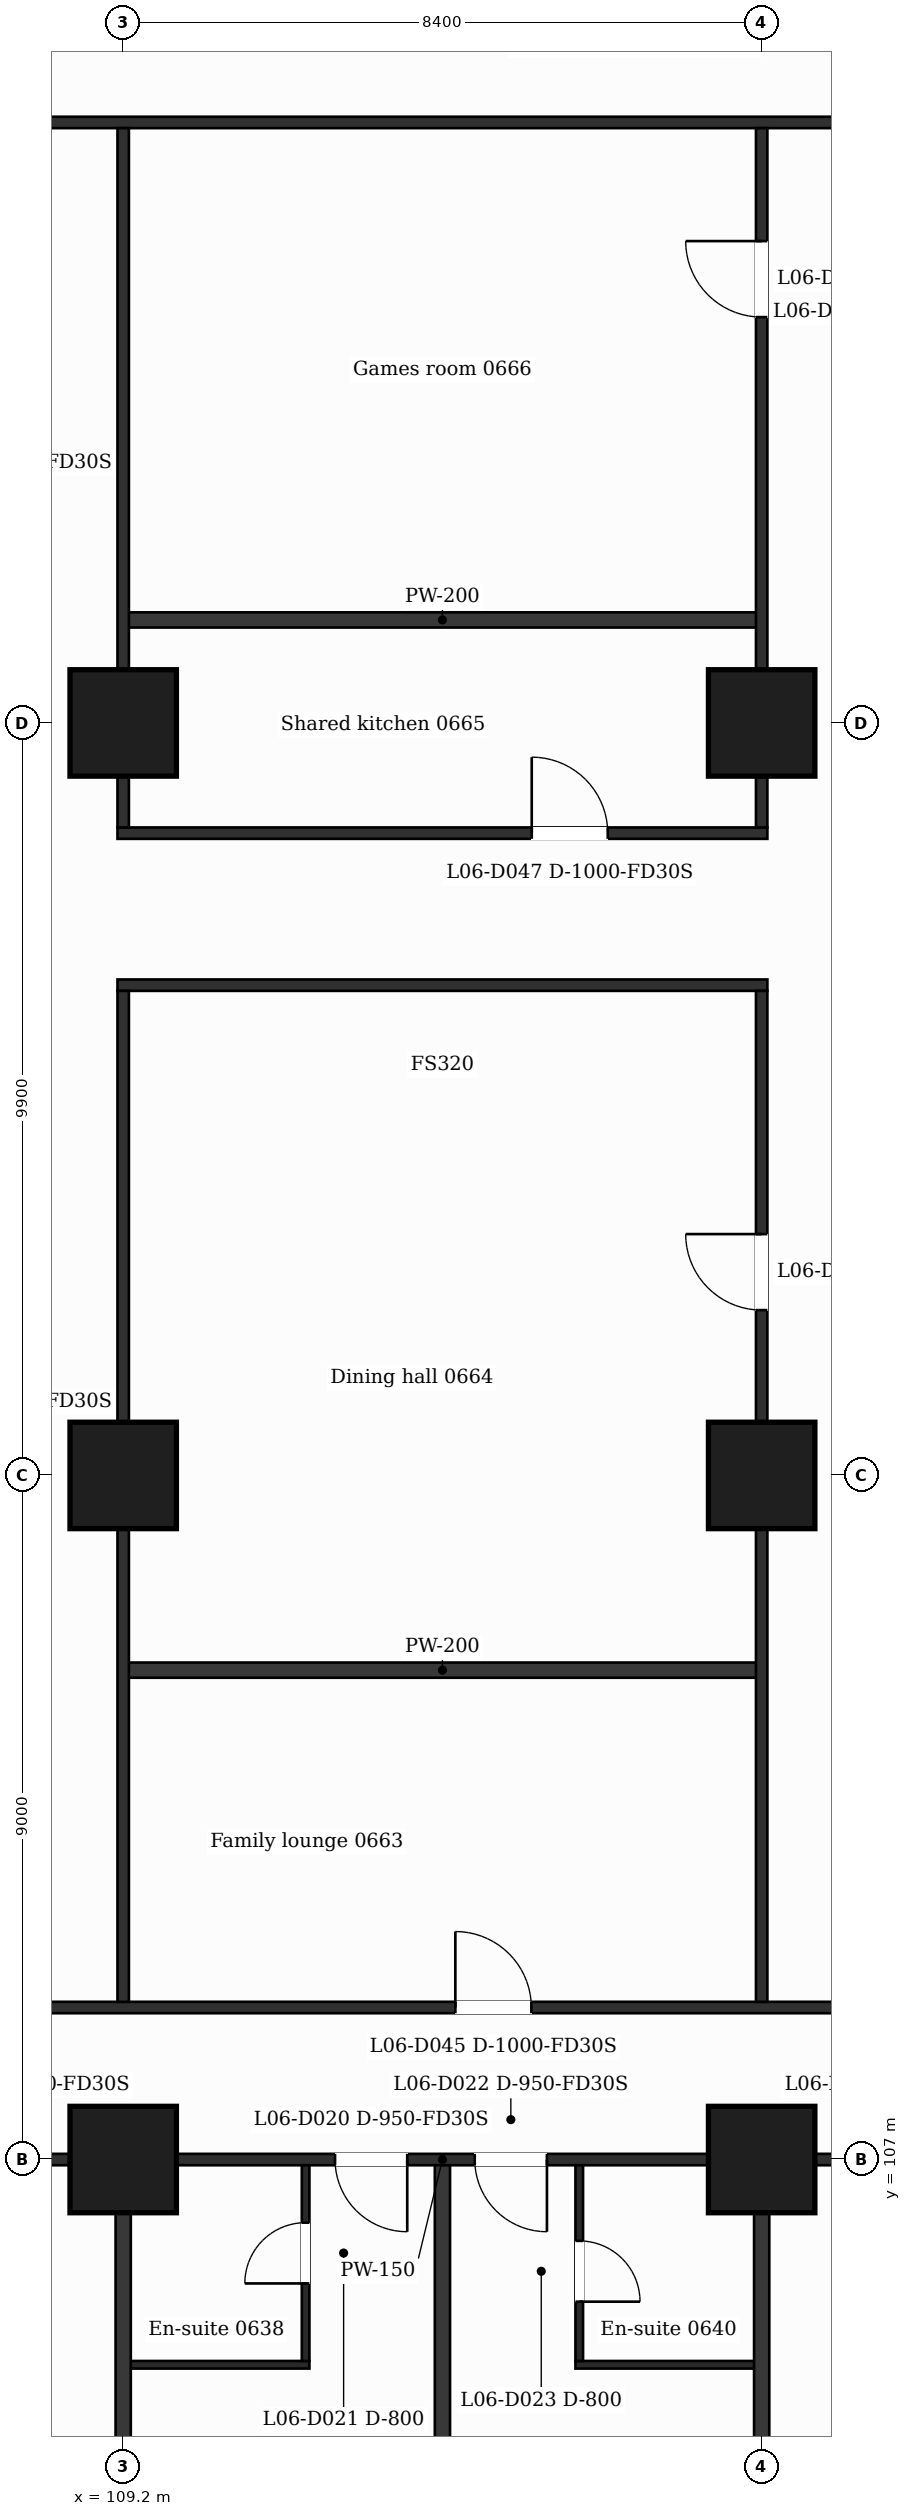
"""IFC4 building model, lengths in metres.
Left out: names, types, materials, properties, quantities, classifications, styles, units other than length and angle.
Written with IfcOpenShell. Run it as: python <this file> out.ifc"""

import sys

from ifc_helpers import new_model, si_unit, direction, frame, frame_2d, origin, origin_2d, place, context, subcontext, project, spatial, rectangle, extrude, element, fill, save


model = new_model("IFC4")
c1 = context("Model", 3, precision=1e-05, world=origin(), true_north=direction((0.0, 1.0)))
c2 = subcontext(c1, "Body", "Model", "MODEL_VIEW")
j1 = project(units=[si_unit("LENGTHUNIT", "METRE"), si_unit("PLANEANGLEUNIT", "RADIAN")], contexts=[c1])
p1 = place(None, origin())
s1 = spatial("IfcSite", under=j1, at=p1, CompositionType="ELEMENT")
p2 = place(p1, origin())
s2 = spatial("IfcBuilding", under=s1, at=p2, CompositionType="ELEMENT")
p3 = place(p2, frame((0.0, 0.0, 39.0)))
s3 = spatial("IfcBuildingStorey", under=s2, at=p3, CompositionType="ELEMENT", Elevation=39.0)
for number, where, z_axis, x_axis in (
    (1, (109.2, 107.0, -0.32), (0.0, 0.0, 1.0), (1.0, 0.0, 0.0)),
    (2, (117.6, 107.0, -0.32), (0.0, 0.0, 1.0), (1.0, 0.0, 0.0)),
    (3, (109.2, 116.0, -0.32), (0.0, 0.0, 1.0), (1.0, 0.0, 0.0)),
    (4, (117.6, 116.0, -0.32), (0.0, 0.0, 1.0), (1.0, 0.0, 0.0)),
    (5, (109.2, 125.9, -0.32), (0.0, 0.0, 1.0), (1.0, 0.0, 0.0)),
    (6, (117.6, 125.9, -0.32), (0.0, 0.0, 1.0), (1.0, 0.0, 0.0)),
):
    element("IfcColumn", number, at=place(p3, frame(where, z_axis=z_axis, x_axis=x_axis)), inside=s3, PredefinedType="COLUMN", context=c2, shape_type="SweptSolid", body=[
        extrude(rectangle(XDim=1.4, YDim=1.4, at=origin_2d()), origin(), (0.0, 0.0, 1.0), 3.82),
    ])
p4 = place(p3, frame((109.2, 104.3, 0.0), z_axis=(0.0, 0.0, 1.0), x_axis=(1.0, 0.0, 0.0)))
e7 = element("IfcWall", 7, at=p4, inside=s3, PredefinedType="PARTITIONING", context=c2, shape_type="SweptSolid", body=[
    extrude(rectangle(XDim=2.45, YDim=0.1, at=frame_2d((1.225, 0.0))), origin(), (0.0, 0.0, 1.0), 3.18),
])
p5 = place(p3, frame((115.15, 104.3, 0.0), z_axis=(0.0, 0.0, 1.0), x_axis=(1.0, 0.0, 0.0)))
e8 = element("IfcWall", 8, at=p5, inside=s3, PredefinedType="PARTITIONING", context=c2, shape_type="SweptSolid", body=[
    extrude(rectangle(XDim=2.45, YDim=0.1, at=frame_2d((1.225, 0.0))), origin(), (0.0, 0.0, 1.0), 3.18),
])
p6 = place(p3, frame((87.018, 107.0, 0.0), z_axis=(0.0, 0.0, 1.0), x_axis=(1.0, 0.0, 0.0)))
e9 = element("IfcWall", 9, at=p6, inside=s3, PredefinedType="PARTITIONING", context=c2, shape_type="SweptSolid", body=[
    extrude(rectangle(XDim=52.765, YDim=0.15, at=frame_2d((26.382, 0.0))), origin(), (0.0, 0.0, 1.0), 3.18),
])
p7 = place(p6, frame((1.032, 0.0, 0.0)))
e10 = element("IfcOpeningElement", 10, at=p7, cuts=e9, PredefinedType="OPENING", context=c2, shape_type="SweptSolid", body=[
    extrude(rectangle(XDim=0.95, YDim=2.1, at=frame_2d((0.475, 1.05))), frame((0.0, 0.085, 0.0), z_axis=(0.0, -1.0, 0.0), x_axis=(1.0, 0.0, 0.0)), (0.0, 0.0, 1.0), 0.17),
])
p8 = place(p6, frame((6.369, 0.0, 0.0)))
e11 = element("IfcOpeningElement", 11, at=p8, cuts=e9, PredefinedType="OPENING", context=c2, shape_type="SweptSolid", body=[
    extrude(rectangle(XDim=0.95, YDim=2.1, at=frame_2d((0.475, 1.05))), frame((0.0, 0.085, 0.0), z_axis=(0.0, -1.0, 0.0), x_axis=(1.0, 0.0, 0.0)), (0.0, 0.0, 1.0), 0.17),
])
p9 = place(p6, frame((10.952, 0.0, 0.0)))
e12 = element("IfcOpeningElement", 12, at=p9, cuts=e9, PredefinedType="OPENING", context=c2, shape_type="SweptSolid", body=[
    extrude(rectangle(XDim=0.95, YDim=2.1, at=frame_2d((0.475, 1.05))), frame((0.0, 0.085, 0.0), z_axis=(0.0, -1.0, 0.0), x_axis=(1.0, 0.0, 0.0)), (0.0, 0.0, 1.0), 0.17),
])
p10 = place(p6, frame((16.045, 0.0, 0.0)))
e13 = element("IfcOpeningElement", 13, at=p10, cuts=e9, PredefinedType="OPENING", context=c2, shape_type="SweptSolid", body=[
    extrude(rectangle(XDim=0.95, YDim=2.1, at=frame_2d((0.475, 1.05))), frame((0.0, 0.085, 0.0), z_axis=(0.0, -1.0, 0.0), x_axis=(1.0, 0.0, 0.0)), (0.0, 0.0, 1.0), 0.17),
])
p11 = place(p6, frame((20.245, 0.0, 0.0)))
e14 = element("IfcOpeningElement", 14, at=p11, cuts=e9, PredefinedType="OPENING", context=c2, shape_type="SweptSolid", body=[
    extrude(rectangle(XDim=0.95, YDim=2.1, at=frame_2d((0.475, 1.05))), frame((0.0, 0.085, 0.0), z_axis=(0.0, -1.0, 0.0), x_axis=(1.0, 0.0, 0.0)), (0.0, 0.0, 1.0), 0.17),
])
p12 = place(p6, frame((24.969, 0.0, 0.0)))
e15 = element("IfcOpeningElement", 15, at=p12, cuts=e9, PredefinedType="OPENING", context=c2, shape_type="SweptSolid", body=[
    extrude(rectangle(XDim=0.95, YDim=2.1, at=frame_2d((0.475, 1.05))), frame((0.0, 0.085, 0.0), z_axis=(0.0, -1.0, 0.0), x_axis=(1.0, 0.0, 0.0)), (0.0, 0.0, 1.0), 0.17),
])
p13 = place(p6, frame((26.807, 0.0, 0.0)))
e16 = element("IfcOpeningElement", 16, at=p13, cuts=e9, PredefinedType="OPENING", context=c2, shape_type="SweptSolid", body=[
    extrude(rectangle(XDim=0.95, YDim=2.1, at=frame_2d((0.475, 1.05))), frame((0.0, 0.085, 0.0), z_axis=(0.0, -1.0, 0.0), x_axis=(1.0, 0.0, 0.0)), (0.0, 0.0, 1.0), 0.17),
])
p14 = place(p6, frame((31.952, 0.0, 0.0)))
e17 = element("IfcOpeningElement", 17, at=p14, cuts=e9, PredefinedType="OPENING", context=c2, shape_type="SweptSolid", body=[
    extrude(rectangle(XDim=0.95, YDim=2.1, at=frame_2d((0.475, 1.05))), frame((0.0, 0.085, 0.0), z_axis=(0.0, -1.0, 0.0), x_axis=(1.0, 0.0, 0.0)), (0.0, 0.0, 1.0), 0.17),
])
p15 = place(p6, frame((40.795, 0.0, 0.0)))
e18 = element("IfcOpeningElement", 18, at=p15, cuts=e9, PredefinedType="OPENING", context=c2, shape_type="SweptSolid", body=[
    extrude(rectangle(XDim=0.95, YDim=2.1, at=frame_2d((0.475, 1.05))), frame((0.0, 0.085, 0.0), z_axis=(0.0, -1.0, 0.0), x_axis=(1.0, 0.0, 0.0)), (0.0, 0.0, 1.0), 0.17),
])
p16 = place(p6, frame((43.644, 0.0, 0.0)))
e19 = element("IfcOpeningElement", 19, at=p16, cuts=e9, PredefinedType="OPENING", context=c2, shape_type="SweptSolid", body=[
    extrude(rectangle(XDim=0.95, YDim=2.1, at=frame_2d((0.475, 1.05))), frame((0.0, 0.085, 0.0), z_axis=(0.0, -1.0, 0.0), x_axis=(1.0, 0.0, 0.0)), (0.0, 0.0, 1.0), 0.17),
])
p17 = place(p6, frame((48.767, 0.0, 0.0)))
e20 = element("IfcOpeningElement", 20, at=p17, cuts=e9, PredefinedType="OPENING", context=c2, shape_type="SweptSolid", body=[
    extrude(rectangle(XDim=0.95, YDim=2.1, at=frame_2d((0.475, 1.05))), frame((0.0, 0.085, 0.0), z_axis=(0.0, -1.0, 0.0), x_axis=(1.0, 0.0, 0.0)), (0.0, 0.0, 1.0), 0.17),
])
p18 = place(p3, frame((100.725, 109.0, 0.0), z_axis=(0.0, 0.0, 1.0), x_axis=(1.0, 0.0, 0.0)))
e21 = element("IfcWall", 21, at=p18, inside=s3, PredefinedType="PARTITIONING", context=c2, shape_type="SweptSolid", body=[
    extrude(rectangle(XDim=25.35, YDim=0.15, at=frame_2d((12.675, 0.0))), origin(), (0.0, 0.0, 1.0), 3.18),
])
p19 = place(p18, frame((1.2, 0.0, 0.0)))
e22 = element("IfcOpeningElement", 22, at=p19, cuts=e21, PredefinedType="OPENING", context=c2, shape_type="SweptSolid", body=[
    extrude(rectangle(XDim=1.0, YDim=2.1, at=frame_2d((0.5, 1.05))), frame((0.0, 0.085, 0.0), z_axis=(0.0, -1.0, 0.0), x_axis=(1.0, 0.0, 0.0)), (0.0, 0.0, 1.0), 0.17),
])
p20 = place(p18, frame((12.845, 0.0, 0.0)))
e23 = element("IfcOpeningElement", 23, at=p20, cuts=e21, PredefinedType="OPENING", context=c2, shape_type="SweptSolid", body=[
    extrude(rectangle(XDim=1.0, YDim=2.1, at=frame_2d((0.5, 1.05))), frame((0.0, 0.085, 0.0), z_axis=(0.0, -1.0, 0.0), x_axis=(1.0, 0.0, 0.0)), (0.0, 0.0, 1.0), 0.17),
])
p21 = place(p18, frame((23.15, 0.0, 0.0)))
e24 = element("IfcOpeningElement", 24, at=p21, cuts=e21, PredefinedType="OPENING", context=c2, shape_type="SweptSolid", body=[
    extrude(rectangle(XDim=1.0, YDim=2.1, at=frame_2d((0.5, 1.05))), frame((0.0, 0.085, 0.0), z_axis=(0.0, -1.0, 0.0), x_axis=(1.0, 0.0, 0.0)), (0.0, 0.0, 1.0), 0.17),
])
p22 = place(p3, frame((109.2, 113.438, 0.0), z_axis=(0.0, 0.0, 1.0), x_axis=(1.0, 0.0, 0.0)))
e25 = element("IfcWall", 25, at=p22, inside=s3, PredefinedType="PARTITIONING", context=c2, shape_type="SweptSolid", body=[
    extrude(rectangle(XDim=8.4, YDim=0.2, at=frame_2d((4.2, 0.0))), origin(), (0.0, 0.0, 1.0), 3.18),
])
p23 = place(p3, frame((109.125, 122.45, 0.0), z_axis=(0.0, 0.0, 1.0), x_axis=(1.0, 0.0, 0.0)))
e26 = element("IfcWall", 26, at=p23, inside=s3, PredefinedType="PARTITIONING", context=c2, shape_type="SweptSolid", body=[
    extrude(rectangle(XDim=8.55, YDim=0.15, at=frame_2d((4.275, 0.0))), origin(), (0.0, 0.0, 1.0), 3.18),
])
p24 = place(p3, frame((109.125, 124.45, 0.0), z_axis=(0.0, 0.0, 1.0), x_axis=(1.0, 0.0, 0.0)))
e27 = element("IfcWall", 27, at=p24, inside=s3, PredefinedType="PARTITIONING", context=c2, shape_type="SweptSolid", body=[
    extrude(rectangle(XDim=8.55, YDim=0.15, at=frame_2d((4.275, 0.0))), origin(), (0.0, 0.0, 1.0), 3.18),
])
p25 = place(p24, frame((5.45, 0.0, 0.0)))
e28 = element("IfcOpeningElement", 28, at=p25, cuts=e27, PredefinedType="OPENING", context=c2, shape_type="SweptSolid", body=[
    extrude(rectangle(XDim=1.0, YDim=2.1, at=frame_2d((0.5, 1.05))), frame((0.0, 0.085, 0.0), z_axis=(0.0, -1.0, 0.0), x_axis=(1.0, 0.0, 0.0)), (0.0, 0.0, 1.0), 0.17),
])
p26 = place(p3, frame((109.2, 127.255, 0.0), z_axis=(0.0, 0.0, 1.0), x_axis=(1.0, 0.0, 0.0)))
e29 = element("IfcWall", 29, at=p26, inside=s3, PredefinedType="PARTITIONING", context=c2, shape_type="SweptSolid", body=[
    extrude(rectangle(XDim=8.4, YDim=0.2, at=frame_2d((4.2, 0.0))), origin(), (0.0, 0.0, 1.0), 3.18),
])
p27 = place(p3, frame((100.725, 133.8, 0.0), z_axis=(0.0, 0.0, 1.0), x_axis=(1.0, 0.0, 0.0)))
e30 = element("IfcWall", 30, at=p27, inside=s3, PredefinedType="PARTITIONING", context=c2, shape_type="SweptSolid", body=[
    extrude(rectangle(XDim=25.35, YDim=0.15, at=frame_2d((12.675, 0.0))), origin(), (0.0, 0.0, 1.0), 3.18),
])
p28 = place(p3, frame((109.2, 99.79, 0.0), z_axis=(0.0, 0.0, 1.0), x_axis=(0.0, 1.0, 0.0)))
e31 = element("IfcWall", 31, at=p28, inside=s3, PredefinedType="PARTITIONING", context=c2, shape_type="SweptSolid", body=[
    extrude(rectangle(XDim=7.135, YDim=0.2, at=frame_2d((3.567, 0.0))), origin(), (0.0, 0.0, 1.0), 3.18),
])
p29 = place(p3, frame((109.2, 109.075, 0.0), z_axis=(0.0, 0.0, 1.0), x_axis=(0.0, 1.0, 0.0)))
e32 = element("IfcWall", 32, at=p29, inside=s3, PredefinedType="PARTITIONING", context=c2, shape_type="SweptSolid", body=[
    extrude(rectangle(XDim=13.3, YDim=0.15, at=frame_2d((6.65, 0.0))), origin(), (0.0, 0.0, 1.0), 3.18),
])
p30 = place(p3, frame((109.2, 124.525, 0.0), z_axis=(0.0, 0.0, 1.0), x_axis=(0.0, 1.0, 0.0)))
e33 = element("IfcWall", 33, at=p30, inside=s3, PredefinedType="PARTITIONING", context=c2, shape_type="SweptSolid", body=[
    extrude(rectangle(XDim=9.2, YDim=0.15, at=frame_2d((4.6, 0.0))), origin(), (0.0, 0.0, 1.0), 3.18),
])
p31 = place(p3, frame((111.6, 104.35, 0.0), z_axis=(0.0, 0.0, 1.0), x_axis=(0.0, 1.0, 0.0)))
e34 = element("IfcWall", 34, at=p31, inside=s3, PredefinedType="PARTITIONING", context=c2, shape_type="SweptSolid", body=[
    extrude(rectangle(XDim=2.575, YDim=0.1, at=frame_2d((1.288, 0.0))), origin(), (0.0, 0.0, 1.0), 3.18),
])
p32 = place(p31, frame((1.02, 0.0, 0.0)))
e35 = element("IfcOpeningElement", 35, at=p32, cuts=e34, PredefinedType="OPENING", context=c2, shape_type="SweptSolid", body=[
    extrude(rectangle(XDim=0.8, YDim=2.1, at=frame_2d((0.4, 1.05))), frame((0.0, 0.06, 0.0), z_axis=(0.0, -1.0, 0.0), x_axis=(1.0, 0.0, 0.0)), (0.0, 0.0, 1.0), 0.12),
])
p33 = place(p3, frame((113.4, 99.79, 0.0), z_axis=(0.0, 0.0, 1.0), x_axis=(0.0, 1.0, 0.0)))
e36 = element("IfcWall", 36, at=p33, inside=s3, PredefinedType="PARTITIONING", context=c2, shape_type="SweptSolid", body=[
    extrude(rectangle(XDim=7.135, YDim=0.2, at=frame_2d((3.567, 0.0))), origin(), (0.0, 0.0, 1.0), 3.18),
])
p34 = place(p3, frame((115.2, 104.35, 0.0), z_axis=(0.0, 0.0, 1.0), x_axis=(0.0, 1.0, 0.0)))
e37 = element("IfcWall", 37, at=p34, inside=s3, PredefinedType="PARTITIONING", context=c2, shape_type="SweptSolid", body=[
    extrude(rectangle(XDim=2.575, YDim=0.1, at=frame_2d((1.288, 0.0))), origin(), (0.0, 0.0, 1.0), 3.18),
])
p35 = place(p34, frame((0.78, 0.0, 0.0)))
e38 = element("IfcOpeningElement", 38, at=p35, cuts=e37, PredefinedType="OPENING", context=c2, shape_type="SweptSolid", body=[
    extrude(rectangle(XDim=0.8, YDim=2.1, at=frame_2d((0.4, 1.05))), frame((0.0, 0.06, 0.0), z_axis=(0.0, -1.0, 0.0), x_axis=(1.0, 0.0, 0.0)), (0.0, 0.0, 1.0), 0.12),
])
p36 = place(p3, frame((117.6, 99.79, 0.0), z_axis=(0.0, 0.0, 1.0), x_axis=(0.0, 1.0, 0.0)))
e39 = element("IfcWall", 39, at=p36, inside=s3, PredefinedType="PARTITIONING", context=c2, shape_type="SweptSolid", body=[
    extrude(rectangle(XDim=7.135, YDim=0.2, at=frame_2d((3.567, 0.0))), origin(), (0.0, 0.0, 1.0), 3.18),
])
p37 = place(p3, frame((117.6, 109.075, 0.0), z_axis=(0.0, 0.0, 1.0), x_axis=(0.0, 1.0, 0.0)))
e40 = element("IfcWall", 40, at=p37, inside=s3, PredefinedType="PARTITIONING", context=c2, shape_type="SweptSolid", body=[
    extrude(rectangle(XDim=13.3, YDim=0.15, at=frame_2d((6.65, 0.0))), origin(), (0.0, 0.0, 1.0), 3.18),
])
p38 = place(p37, frame((9.1, 0.0, 0.0)))
e41 = element("IfcOpeningElement", 41, at=p38, cuts=e40, PredefinedType="OPENING", context=c2, shape_type="SweptSolid", body=[
    extrude(rectangle(XDim=1.0, YDim=2.1, at=frame_2d((0.5, 1.05))), frame((0.0, 0.085, 0.0), z_axis=(0.0, -1.0, 0.0), x_axis=(1.0, 0.0, 0.0)), (0.0, 0.0, 1.0), 0.17),
])
p39 = place(p3, frame((117.6, 124.525, 0.0), z_axis=(0.0, 0.0, 1.0), x_axis=(0.0, 1.0, 0.0)))
e42 = element("IfcWall", 42, at=p39, inside=s3, PredefinedType="PARTITIONING", context=c2, shape_type="SweptSolid", body=[
    extrude(rectangle(XDim=9.2, YDim=0.15, at=frame_2d((4.6, 0.0))), origin(), (0.0, 0.0, 1.0), 3.18),
])
p40 = place(p39, frame((6.714, 0.0, 0.0)))
e43 = element("IfcOpeningElement", 43, at=p40, cuts=e42, PredefinedType="OPENING", context=c2, shape_type="SweptSolid", body=[
    extrude(rectangle(XDim=1.0, YDim=2.1, at=frame_2d((0.5, 1.05))), frame((0.0, 0.085, 0.0), z_axis=(0.0, -1.0, 0.0), x_axis=(1.0, 0.0, 0.0)), (0.0, 0.0, 1.0), 0.17),
])
p41 = place(p12, origin())
e44 = element("IfcDoor", 44, at=p41, inside=s3, OperationType="SINGLE_SWING_RIGHT", PredefinedType="DOOR", context=c2, shape_type="SweptSolid", body=[
    extrude(rectangle(XDim=0.95, YDim=2.1, at=frame_2d((0.475, 1.05))), frame((0.0, 0.025, 0.0), z_axis=(0.0, -1.0, 0.0), x_axis=(1.0, 0.0, 0.0)), (0.0, 0.0, 1.0), 0.05),
])
fill(e15, e44)
p42 = place(p32, origin())
e45 = element("IfcDoor", 45, at=p42, inside=s3, OperationType="SINGLE_SWING_LEFT", PredefinedType="DOOR", context=c2, shape_type="SweptSolid", body=[
    extrude(rectangle(XDim=0.8, YDim=2.1, at=frame_2d((0.4, 1.05))), frame((0.0, 0.025, 0.0), z_axis=(0.0, -1.0, 0.0), x_axis=(1.0, 0.0, 0.0)), (0.0, 0.0, 1.0), 0.05),
])
fill(e35, e45)
p43 = place(p13, origin())
e46 = element("IfcDoor", 46, at=p43, inside=s3, OperationType="SINGLE_SWING_RIGHT", PredefinedType="DOOR", context=c2, shape_type="SweptSolid", body=[
    extrude(rectangle(XDim=0.95, YDim=2.1, at=frame_2d((0.475, 1.05))), frame((0.0, 0.025, 0.0), z_axis=(0.0, -1.0, 0.0), x_axis=(1.0, 0.0, 0.0)), (0.0, 0.0, 1.0), 0.05),
])
fill(e16, e46)
p44 = place(p35, origin())
e47 = element("IfcDoor", 47, at=p44, inside=s3, OperationType="SINGLE_SWING_LEFT", PredefinedType="DOOR", context=c2, shape_type="SweptSolid", body=[
    extrude(rectangle(XDim=0.8, YDim=2.1, at=frame_2d((0.4, 1.05))), frame((0.0, 0.025, 0.0), z_axis=(0.0, -1.0, 0.0), x_axis=(1.0, 0.0, 0.0)), (0.0, 0.0, 1.0), 0.05),
])
fill(e38, e47)
p45 = place(p20, origin())
e48 = element("IfcDoor", 48, at=p45, inside=s3, OperationType="SINGLE_SWING_LEFT", PredefinedType="DOOR", context=c2, shape_type="SweptSolid", body=[
    extrude(rectangle(XDim=1.0, YDim=2.1, at=frame_2d((0.5, 1.05))), frame((0.0, 0.025, 0.0), z_axis=(0.0, -1.0, 0.0), x_axis=(1.0, 0.0, 0.0)), (0.0, 0.0, 1.0), 0.05),
])
fill(e23, e48)
p46 = place(p38, origin())
e49 = element("IfcDoor", 49, at=p46, inside=s3, OperationType="SINGLE_SWING_RIGHT", PredefinedType="DOOR", context=c2, shape_type="SweptSolid", body=[
    extrude(rectangle(XDim=1.0, YDim=2.1, at=frame_2d((0.5, 1.05))), frame((0.0, 0.025, 0.0), z_axis=(0.0, -1.0, 0.0), x_axis=(1.0, 0.0, 0.0)), (0.0, 0.0, 1.0), 0.05),
])
fill(e41, e49)
p47 = place(p25, origin())
e50 = element("IfcDoor", 50, at=p47, inside=s3, OperationType="SINGLE_SWING_LEFT", PredefinedType="DOOR", context=c2, shape_type="SweptSolid", body=[
    extrude(rectangle(XDim=1.0, YDim=2.1, at=frame_2d((0.5, 1.05))), frame((0.0, 0.025, 0.0), z_axis=(0.0, -1.0, 0.0), x_axis=(1.0, 0.0, 0.0)), (0.0, 0.0, 1.0), 0.05),
])
fill(e28, e50)
p48 = place(p40, origin())
e51 = element("IfcDoor", 51, at=p48, inside=s3, OperationType="SINGLE_SWING_RIGHT", PredefinedType="DOOR", context=c2, shape_type="SweptSolid", body=[
    extrude(rectangle(XDim=1.0, YDim=2.1, at=frame_2d((0.5, 1.05))), frame((0.0, 0.025, 0.0), z_axis=(0.0, -1.0, 0.0), x_axis=(1.0, 0.0, 0.0)), (0.0, 0.0, 1.0), 0.05),
])
fill(e43, e51)
save(model, sys.argv[1])
